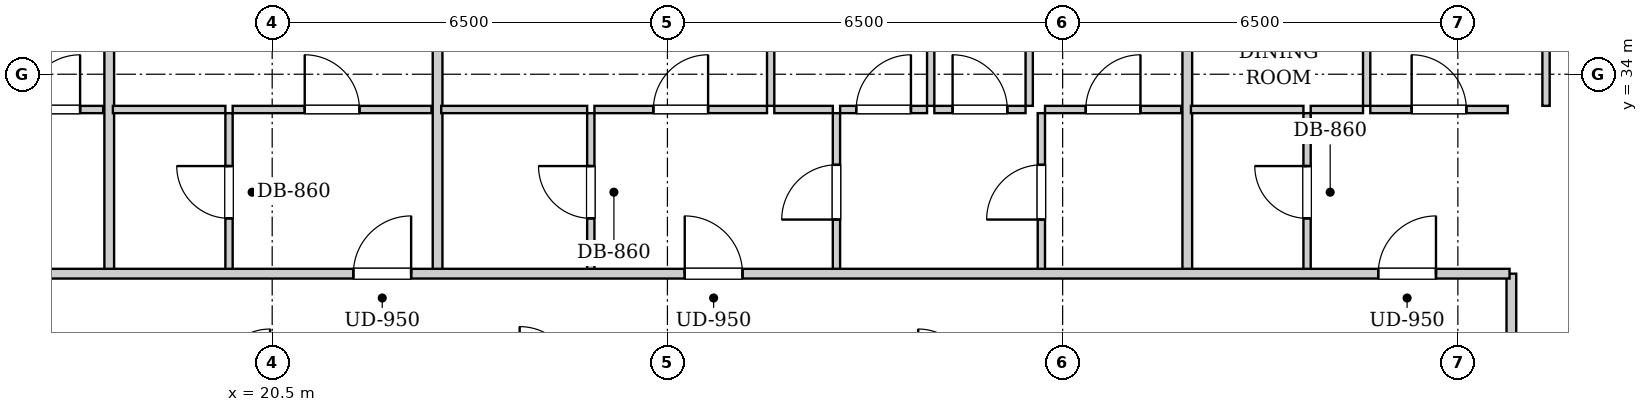
"""IFC4 building model, lengths in metres.
Left out: names, types, materials, properties, quantities, classifications, styles, units other than length and angle.
Written with IfcOpenShell. Run it as: python <this file> out.ifc"""

import sys

from ifc_helpers import new_model, si_unit, direction, frame, frame_2d, origin, place, context, subcontext, project, spatial, rectangle, extrude, element, fill, save


model = new_model("IFC4")
c1 = context("Model", 3, precision=1e-05, world=origin(), true_north=direction((0.0, 1.0)))
c2 = subcontext(c1, "Body", "Model", "MODEL_VIEW")
j1 = project(units=[si_unit("LENGTHUNIT", "METRE"), si_unit("PLANEANGLEUNIT", "RADIAN")], contexts=[c1])
p1 = place(None, origin())
s1 = spatial("IfcSite", under=j1, at=p1, CompositionType="ELEMENT")
p2 = place(p1, origin())
s2 = spatial("IfcBuilding", under=s1, at=p2, CompositionType="ELEMENT")
p3 = place(p2, frame((0.0, 0.0, 107.1)))
s3 = spatial("IfcBuildingStorey", under=s2, at=p3, CompositionType="ELEMENT", Elevation=107.1)
p4 = place(p3, frame((40.88, 28.98, 0.0), z_axis=(0.0, 0.0, 1.0), x_axis=(0.0, 1.0, 0.0)))
e1 = element("IfcWall", 1, at=p4, inside=s3, PredefinedType="PARTITIONING", context=c2, shape_type="SweptSolid", body=[
    extrude(rectangle(XDim=1.74, YDim=0.16, at=frame_2d((0.87, 0.0))), origin(), (0.0, 0.0, 1.0), 2.94),
])
p5 = place(p3, frame((16.062, 33.42, 0.0), z_axis=(0.0, 0.0, 1.0), x_axis=(1.0, 0.0, 0.0)))
e2 = element("IfcWall", 2, at=p5, inside=s3, PredefinedType="PARTITIONING", context=c2, shape_type="SweptSolid", body=[
    extrude(rectangle(XDim=1.658, YDim=0.12, at=frame_2d((0.829, 0.0))), origin(), (0.0, 0.0, 1.0), 2.94),
])
p6 = place(p5, frame((0.379, 0.0, 0.0)))
e3 = element("IfcOpeningElement", 3, at=p6, cuts=e2, PredefinedType="OPENING", context=c2, shape_type="SweptSolid", body=[
    extrude(rectangle(XDim=0.9, YDim=2.05, at=frame_2d((0.45, 1.025))), frame((0.0, 0.07, 0.0), z_axis=(0.0, -1.0, 0.0), x_axis=(1.0, 0.0, 0.0)), (0.0, 0.0, 1.0), 0.14),
])
p7 = place(p3, frame((17.82, 30.76, 0.0), z_axis=(0.0, 0.0, 1.0), x_axis=(0.0, 1.0, 0.0)))
e4 = element("IfcWall", 4, at=p7, inside=s3, PredefinedType="PARTITIONING", context=c2, shape_type="SweptSolid", body=[
    extrude(rectangle(XDim=12.26, YDim=0.16, at=frame_2d((6.13, 0.0))), origin(), (0.0, 0.0, 1.0), 2.313),
])
p8 = place(p3, frame((19.79, 30.76, 0.0), z_axis=(0.0, 0.0, 1.0), x_axis=(0.0, 1.0, 0.0)))
e5 = element("IfcWall", 5, at=p8, inside=s3, PredefinedType="PARTITIONING", context=c2, shape_type="SweptSolid", body=[
    extrude(rectangle(XDim=2.6, YDim=0.12, at=frame_2d((1.3, 0.0))), origin(), (0.0, 0.0, 1.0), 2.94),
])
p9 = place(p8, frame((0.87, 0.0, 0.0)))
e6 = element("IfcOpeningElement", 6, at=p9, cuts=e5, PredefinedType="OPENING", context=c2, shape_type="SweptSolid", body=[
    extrude(rectangle(XDim=0.86, YDim=2.05, at=frame_2d((0.43, 1.025))), frame((0.0, 0.07, 0.0), z_axis=(0.0, -1.0, 0.0), x_axis=(1.0, 0.0, 0.0)), (0.0, 0.0, 1.0), 0.14),
])
p10 = place(p3, frame((17.88, 33.42, 0.0), z_axis=(0.0, 0.0, 1.0), x_axis=(1.0, 0.0, 0.0)))
e7 = element("IfcWall", 7, at=p10, inside=s3, PredefinedType="PARTITIONING", context=c2, shape_type="SweptSolid", body=[
    extrude(rectangle(XDim=1.85, YDim=0.12, at=frame_2d((0.925, 0.0))), origin(), (0.0, 0.0, 1.0), 2.94),
])
p11 = place(p3, frame((19.85, 33.42, 0.0), z_axis=(0.0, 0.0, 1.0), x_axis=(1.0, 0.0, 0.0)))
e8 = element("IfcWall", 8, at=p11, inside=s3, PredefinedType="PARTITIONING", context=c2, shape_type="SweptSolid", body=[
    extrude(rectangle(XDim=3.27, YDim=0.12, at=frame_2d((1.635, 0.0))), origin(), (0.0, 0.0, 1.0), 2.94),
])
p12 = place(p11, frame((1.185, 0.0, 0.0)))
e9 = element("IfcOpeningElement", 9, at=p12, cuts=e8, PredefinedType="OPENING", context=c2, shape_type="SweptSolid", body=[
    extrude(rectangle(XDim=0.9, YDim=2.05, at=frame_2d((0.45, 1.025))), frame((0.0, 0.07, 0.0), z_axis=(0.0, -1.0, 0.0), x_axis=(1.0, 0.0, 0.0)), (0.0, 0.0, 1.0), 0.14),
])
p13 = place(p3, frame((23.22, 30.76, 0.0), z_axis=(0.0, 0.0, 1.0), x_axis=(0.0, 1.0, 0.0)))
e10 = element("IfcWall", 10, at=p13, inside=s3, PredefinedType="PARTITIONING", context=c2, shape_type="SweptSolid", body=[
    extrude(rectangle(XDim=12.26, YDim=0.16, at=frame_2d((6.13, 0.0))), origin(), (0.0, 0.0, 1.0), 2.94),
])
p14 = place(p3, frame((25.74, 30.76, 0.0), z_axis=(0.0, 0.0, 1.0), x_axis=(0.0, 1.0, 0.0)))
e11 = element("IfcWall", 11, at=p14, inside=s3, PredefinedType="PARTITIONING", context=c2, shape_type="SweptSolid", body=[
    extrude(rectangle(XDim=2.6, YDim=0.12, at=frame_2d((1.3, 0.0))), origin(), (0.0, 0.0, 1.0), 2.94),
])
p15 = place(p14, frame((0.87, 0.0, 0.0)))
e12 = element("IfcOpeningElement", 12, at=p15, cuts=e11, PredefinedType="OPENING", context=c2, shape_type="SweptSolid", body=[
    extrude(rectangle(XDim=0.86, YDim=2.05, at=frame_2d((0.43, 1.025))), frame((0.0, 0.07, 0.0), z_axis=(0.0, -1.0, 0.0), x_axis=(1.0, 0.0, 0.0)), (0.0, 0.0, 1.0), 0.14),
])
p16 = place(p3, frame((23.28, 33.42, 0.0), z_axis=(0.0, 0.0, 1.0), x_axis=(1.0, 0.0, 0.0)))
e13 = element("IfcWall", 13, at=p16, inside=s3, PredefinedType="PARTITIONING", context=c2, shape_type="SweptSolid", body=[
    extrude(rectangle(XDim=2.4, YDim=0.12, at=frame_2d((1.2, 0.0))), origin(), (0.0, 0.0, 1.0), 2.94),
])
p17 = place(p3, frame((29.78, 30.76, 0.0), z_axis=(0.0, 0.0, 1.0), x_axis=(0.0, 1.0, 0.0)))
e14 = element("IfcWall", 14, at=p17, inside=s3, PredefinedType="PARTITIONING", context=c2, shape_type="SweptSolid", body=[
    extrude(rectangle(XDim=2.6, YDim=0.12, at=frame_2d((1.3, 0.0))), origin(), (0.0, 0.0, 1.0), 2.94),
])
p18 = place(p17, frame((0.85, 0.0, 0.0)))
e15 = element("IfcOpeningElement", 15, at=p18, cuts=e14, PredefinedType="OPENING", context=c2, shape_type="SweptSolid", body=[
    extrude(rectangle(XDim=0.9, YDim=2.05, at=frame_2d((0.45, 1.025))), frame((0.0, 0.07, 0.0), z_axis=(0.0, -1.0, 0.0), x_axis=(1.0, 0.0, 0.0)), (0.0, 0.0, 1.0), 0.14),
])
p19 = place(p3, frame((25.8, 33.42, 0.0), z_axis=(0.0, 0.0, 1.0), x_axis=(1.0, 0.0, 0.0)))
e16 = element("IfcWall", 16, at=p19, inside=s3, PredefinedType="PARTITIONING", context=c2, shape_type="SweptSolid", body=[
    extrude(rectangle(XDim=2.838, YDim=0.12, at=frame_2d((1.419, 0.0))), origin(), (0.0, 0.0, 1.0), 2.94),
])
p20 = place(p19, frame((0.969, 0.0, 0.0)))
e17 = element("IfcOpeningElement", 17, at=p20, cuts=e16, PredefinedType="OPENING", context=c2, shape_type="SweptSolid", body=[
    extrude(rectangle(XDim=0.9, YDim=2.05, at=frame_2d((0.45, 1.025))), frame((0.0, 0.07, 0.0), z_axis=(0.0, -1.0, 0.0), x_axis=(1.0, 0.0, 0.0)), (0.0, 0.0, 1.0), 0.14),
])
p21 = place(p3, frame((28.758, 33.42, 0.0), z_axis=(0.0, 0.0, 1.0), x_axis=(1.0, 0.0, 0.0)))
e18 = element("IfcWall", 18, at=p21, inside=s3, PredefinedType="PARTITIONING", context=c2, shape_type="SweptSolid", body=[
    extrude(rectangle(XDim=0.962, YDim=0.12, at=frame_2d((0.481, 0.0))), origin(), (0.0, 0.0, 1.0), 2.94),
])
p22 = place(p3, frame((33.15, 30.76, 0.0), z_axis=(0.0, 0.0, 1.0), x_axis=(0.0, 1.0, 0.0)))
e19 = element("IfcWall", 19, at=p22, inside=s3, PredefinedType="PARTITIONING", context=c2, shape_type="SweptSolid", body=[
    extrude(rectangle(XDim=2.6, YDim=0.12, at=frame_2d((1.3, 0.0))), origin(), (0.0, 0.0, 1.0), 2.313),
])
p23 = place(p22, frame((0.85, 0.0, 0.0)))
e20 = element("IfcOpeningElement", 20, at=p23, cuts=e19, PredefinedType="OPENING", context=c2, shape_type="SweptSolid", body=[
    extrude(rectangle(XDim=0.9, YDim=2.05, at=frame_2d((0.45, 1.025))), frame((0.0, 0.07, 0.0), z_axis=(0.0, -1.0, 0.0), x_axis=(1.0, 0.0, 0.0)), (0.0, 0.0, 1.0), 0.14),
])
p24 = place(p3, frame((29.84, 33.42, 0.0), z_axis=(0.0, 0.0, 1.0), x_axis=(1.0, 0.0, 0.0)))
e21 = element("IfcWall", 21, at=p24, inside=s3, PredefinedType="PARTITIONING", context=c2, shape_type="SweptSolid", body=[
    extrude(rectangle(XDim=1.43, YDim=0.12, at=frame_2d((0.715, 0.0))), origin(), (0.0, 0.0, 1.0), 2.94),
])
p25 = place(p24, frame((0.265, 0.0, 0.0)))
e22 = element("IfcOpeningElement", 22, at=p25, cuts=e21, PredefinedType="OPENING", context=c2, shape_type="SweptSolid", body=[
    extrude(rectangle(XDim=0.9, YDim=2.05, at=frame_2d((0.45, 1.025))), frame((0.0, 0.07, 0.0), z_axis=(0.0, -1.0, 0.0), x_axis=(1.0, 0.0, 0.0)), (0.0, 0.0, 1.0), 0.14),
])
p26 = place(p3, frame((31.39, 33.42, 0.0), z_axis=(0.0, 0.0, 1.0), x_axis=(1.0, 0.0, 0.0)))
e23 = element("IfcWall", 23, at=p26, inside=s3, PredefinedType="PARTITIONING", context=c2, shape_type="SweptSolid", body=[
    extrude(rectangle(XDim=1.5, YDim=0.12, at=frame_2d((0.75, 0.0))), origin(), (0.0, 0.0, 1.0), 2.94),
])
p27 = place(p26, frame((0.3, 0.0, 0.0)))
e24 = element("IfcOpeningElement", 24, at=p27, cuts=e23, PredefinedType="OPENING", context=c2, shape_type="SweptSolid", body=[
    extrude(rectangle(XDim=0.9, YDim=2.05, at=frame_2d((0.45, 1.025))), frame((0.0, 0.07, 0.0), z_axis=(0.0, -1.0, 0.0), x_axis=(1.0, 0.0, 0.0)), (0.0, 0.0, 1.0), 0.14),
])
p28 = place(p3, frame((33.21, 33.42, 0.0), z_axis=(0.0, 0.0, 1.0), x_axis=(1.0, 0.0, 0.0)))
e25 = element("IfcWall", 25, at=p28, inside=s3, PredefinedType="PARTITIONING", context=c2, shape_type="SweptSolid", body=[
    extrude(rectangle(XDim=2.24, YDim=0.12, at=frame_2d((1.12, 0.0))), origin(), (0.0, 0.0, 1.0), 2.94),
])
p29 = place(p28, frame((0.67, 0.0, 0.0)))
e26 = element("IfcOpeningElement", 26, at=p29, cuts=e25, PredefinedType="OPENING", context=c2, shape_type="SweptSolid", body=[
    extrude(rectangle(XDim=0.9, YDim=2.05, at=frame_2d((0.45, 1.025))), frame((0.0, 0.07, 0.0), z_axis=(0.0, -1.0, 0.0), x_axis=(1.0, 0.0, 0.0)), (0.0, 0.0, 1.0), 0.14),
])
p30 = place(p3, frame((28.698, 33.48, 0.0), z_axis=(0.0, 0.0, 1.0), x_axis=(0.0, 1.0, 0.0)))
e27 = element("IfcWall", 27, at=p30, inside=s3, PredefinedType="PARTITIONING", context=c2, shape_type="SweptSolid", body=[
    extrude(rectangle(XDim=9.54, YDim=0.12, at=frame_2d((4.77, 0.0))), origin(), (0.0, 0.0, 1.0), 2.94),
])
p31 = place(p30, frame((4.305, 0.0, 0.0)))
e28 = element("IfcOpeningElement", 28, at=p31, cuts=e27, PredefinedType="OPENING", context=c2, shape_type="SweptSolid", body=[
    extrude(rectangle(XDim=0.9, YDim=2.05, at=frame_2d((0.45, 1.025))), frame((0.0, 0.07, 0.0), z_axis=(0.0, -1.0, 0.0), x_axis=(1.0, 0.0, 0.0)), (0.0, 0.0, 1.0), 0.14),
])
p32 = place(p3, frame((31.33, 33.48, 0.0), z_axis=(0.0, 0.0, 1.0), x_axis=(0.0, 1.0, 0.0)))
e29 = element("IfcWall", 29, at=p32, inside=s3, PredefinedType="PARTITIONING", context=c2, shape_type="SweptSolid", body=[
    extrude(rectangle(XDim=9.54, YDim=0.12, at=frame_2d((4.77, 0.0))), origin(), (0.0, 0.0, 1.0), 2.94),
])
p33 = place(p32, frame((4.305, 0.0, 0.0)))
e30 = element("IfcOpeningElement", 30, at=p33, cuts=e29, PredefinedType="OPENING", context=c2, shape_type="SweptSolid", body=[
    extrude(rectangle(XDim=0.9, YDim=2.05, at=frame_2d((0.45, 1.025))), frame((0.0, 0.07, 0.0), z_axis=(0.0, -1.0, 0.0), x_axis=(1.0, 0.0, 0.0)), (0.0, 0.0, 1.0), 0.14),
])
p34 = place(p3, frame((32.95, 33.48, 0.0), z_axis=(0.0, 0.0, 1.0), x_axis=(0.0, 1.0, 0.0)))
e31 = element("IfcWall", 31, at=p34, inside=s3, PredefinedType="PARTITIONING", context=c2, shape_type="SweptSolid", body=[
    extrude(rectangle(XDim=7.39, YDim=0.12, at=frame_2d((3.695, 0.0))), origin(), (0.0, 0.0, 1.0), 2.94),
])
p35 = place(p34, frame((3.245, 0.0, 0.0)))
e32 = element("IfcOpeningElement", 32, at=p35, cuts=e31, PredefinedType="OPENING", context=c2, shape_type="SweptSolid", body=[
    extrude(rectangle(XDim=0.9, YDim=2.05, at=frame_2d((0.45, 1.025))), frame((0.0, 0.07, 0.0), z_axis=(0.0, -1.0, 0.0), x_axis=(1.0, 0.0, 0.0)), (0.0, 0.0, 1.0), 0.14),
])
p36 = place(p3, frame((35.55, 30.76, 0.0), z_axis=(0.0, 0.0, 1.0), x_axis=(0.0, 1.0, 0.0)))
e33 = element("IfcWall", 33, at=p36, inside=s3, PredefinedType="PARTITIONING", context=c2, shape_type="SweptSolid", body=[
    extrude(rectangle(XDim=10.28, YDim=0.16, at=frame_2d((5.14, 0.0))), origin(), (0.0, 0.0, 1.0), 2.94),
])
p37 = place(p3, frame((37.52, 30.76, 0.0), z_axis=(0.0, 0.0, 1.0), x_axis=(0.0, 1.0, 0.0)))
e34 = element("IfcWall", 34, at=p37, inside=s3, PredefinedType="PARTITIONING", context=c2, shape_type="SweptSolid", body=[
    extrude(rectangle(XDim=2.6, YDim=0.12, at=frame_2d((1.3, 0.0))), origin(), (0.0, 0.0, 1.0), 2.94),
])
p38 = place(p37, frame((0.87, 0.0, 0.0)))
e35 = element("IfcOpeningElement", 35, at=p38, cuts=e34, PredefinedType="OPENING", context=c2, shape_type="SweptSolid", body=[
    extrude(rectangle(XDim=0.86, YDim=2.05, at=frame_2d((0.43, 1.025))), frame((0.0, 0.07, 0.0), z_axis=(0.0, -1.0, 0.0), x_axis=(1.0, 0.0, 0.0)), (0.0, 0.0, 1.0), 0.14),
])
p39 = place(p3, frame((35.61, 33.42, 0.0), z_axis=(0.0, 0.0, 1.0), x_axis=(1.0, 0.0, 0.0)))
e36 = element("IfcWall", 36, at=p39, inside=s3, PredefinedType="PARTITIONING", context=c2, shape_type="SweptSolid", body=[
    extrude(rectangle(XDim=1.85, YDim=0.12, at=frame_2d((0.925, 0.0))), origin(), (0.0, 0.0, 1.0), 2.94),
])
p40 = place(p3, frame((37.58, 33.42, 0.0), z_axis=(0.0, 0.0, 1.0), x_axis=(1.0, 0.0, 0.0)))
e37 = element("IfcWall", 37, at=p40, inside=s3, PredefinedType="PARTITIONING", context=c2, shape_type="SweptSolid", body=[
    extrude(rectangle(XDim=0.86, YDim=0.12, at=frame_2d((0.43, 0.0))), origin(), (0.0, 0.0, 1.0), 2.94),
])
p41 = place(p3, frame((38.56, 33.42, 0.0), z_axis=(0.0, 0.0, 1.0), x_axis=(1.0, 0.0, 0.0)))
e38 = element("IfcWall", 38, at=p41, inside=s3, PredefinedType="PARTITIONING", context=c2, shape_type="SweptSolid", body=[
    extrude(rectangle(XDim=2.26, YDim=0.12, at=frame_2d((1.13, 0.0))), origin(), (0.0, 0.0, 1.0), 2.94),
])
p42 = place(p41, frame((0.68, 0.0, 0.0)))
e39 = element("IfcOpeningElement", 39, at=p42, cuts=e38, PredefinedType="OPENING", context=c2, shape_type="SweptSolid", body=[
    extrude(rectangle(XDim=0.9, YDim=2.05, at=frame_2d((0.45, 1.025))), frame((0.0, 0.07, 0.0), z_axis=(0.0, -1.0, 0.0), x_axis=(1.0, 0.0, 0.0)), (0.0, 0.0, 1.0), 0.14),
])
p43 = place(p3, frame((38.5, 33.48, 0.0), z_axis=(0.0, 0.0, 1.0), x_axis=(0.0, 1.0, 0.0)))
e40 = element("IfcWall", 40, at=p43, inside=s3, PredefinedType="PARTITIONING", context=c2, shape_type="SweptSolid", body=[
    extrude(rectangle(XDim=7.39, YDim=0.12, at=frame_2d((3.695, 0.0))), origin(), (0.0, 0.0, 1.0), 2.94),
])
p44 = place(p43, frame((3.245, 0.0, 0.0)))
e41 = element("IfcOpeningElement", 41, at=p44, cuts=e40, PredefinedType="OPENING", context=c2, shape_type="SweptSolid", body=[
    extrude(rectangle(XDim=0.9, YDim=2.05, at=frame_2d((0.45, 1.025))), frame((0.0, 0.07, 0.0), z_axis=(0.0, -1.0, 0.0), x_axis=(1.0, 0.0, 0.0)), (0.0, 0.0, 1.0), 0.14),
])
p45 = place(p3, frame((41.45, 33.48, 0.0), z_axis=(0.0, 0.0, 1.0), x_axis=(0.0, 1.0, 0.0)))
e42 = element("IfcWall", 42, at=p45, inside=s3, PredefinedType="PARTITIONING", context=c2, shape_type="SweptSolid", body=[
    extrude(rectangle(XDim=7.39, YDim=0.12, at=frame_2d((3.695, 0.0))), origin(), (0.0, 0.0, 1.0), 2.94),
])
p46 = place(p45, frame((3.2, 0.0, 0.0)))
e43 = element("IfcOpeningElement", 43, at=p46, cuts=e42, PredefinedType="OPENING", context=c2, shape_type="SweptSolid", body=[
    extrude(rectangle(XDim=0.9, YDim=2.05, at=frame_2d((0.45, 1.025))), frame((0.0, 0.07, 0.0), z_axis=(0.0, -1.0, 0.0), x_axis=(1.0, 0.0, 0.0)), (0.0, 0.0, 1.0), 0.14),
])
p47 = place(p3, frame((10.05, 30.72, 0.0), z_axis=(0.0, 0.0, 1.0), x_axis=(1.0, 0.0, 0.0)))
e44 = element("IfcWall", 44, at=p47, inside=s3, PredefinedType="PARTITIONING", context=c2, shape_type="SweptSolid", body=[
    extrude(rectangle(XDim=30.8, YDim=0.16, at=frame_2d((15.4, 0.0))), origin(), (0.0, 0.0, 1.0), 2.94),
])
p48 = place(p47, frame((3.692, 0.0, 0.0)))
e45 = element("IfcOpeningElement", 45, at=p48, cuts=e44, PredefinedType="OPENING", context=c2, shape_type="SweptSolid", body=[
    extrude(rectangle(XDim=0.95, YDim=2.1, at=frame_2d((0.475, 1.05))), frame((0.0, 0.09, 0.0), z_axis=(0.0, -1.0, 0.0), x_axis=(1.0, 0.0, 0.0)), (0.0, 0.0, 1.0), 0.18),
])
p49 = place(p47, frame((11.785, 0.0, 0.0)))
e46 = element("IfcOpeningElement", 46, at=p49, cuts=e44, PredefinedType="OPENING", context=c2, shape_type="SweptSolid", body=[
    extrude(rectangle(XDim=0.95, YDim=2.1, at=frame_2d((0.475, 1.05))), frame((0.0, 0.09, 0.0), z_axis=(0.0, -1.0, 0.0), x_axis=(1.0, 0.0, 0.0)), (0.0, 0.0, 1.0), 0.18),
])
p50 = place(p47, frame((17.235, 0.0, 0.0)))
e47 = element("IfcOpeningElement", 47, at=p50, cuts=e44, PredefinedType="OPENING", context=c2, shape_type="SweptSolid", body=[
    extrude(rectangle(XDim=0.95, YDim=2.1, at=frame_2d((0.475, 1.05))), frame((0.0, 0.09, 0.0), z_axis=(0.0, -1.0, 0.0), x_axis=(1.0, 0.0, 0.0)), (0.0, 0.0, 1.0), 0.18),
])
p51 = place(p47, frame((28.64, 0.0, 0.0)))
e48 = element("IfcOpeningElement", 48, at=p51, cuts=e44, PredefinedType="OPENING", context=c2, shape_type="SweptSolid", body=[
    extrude(rectangle(XDim=0.95, YDim=2.1, at=frame_2d((0.475, 1.05))), frame((0.0, 0.09, 0.0), z_axis=(0.0, -1.0, 0.0), x_axis=(1.0, 0.0, 0.0)), (0.0, 0.0, 1.0), 0.18),
])
p52 = place(p6, origin())
e49 = element("IfcDoor", 49, at=p52, inside=s3, OperationType="SINGLE_SWING_RIGHT", PredefinedType="DOOR", context=c2, shape_type="SweptSolid", body=[
    extrude(rectangle(XDim=0.9, YDim=2.05, at=frame_2d((0.45, 1.025))), frame((0.0, 0.025, 0.0), z_axis=(0.0, -1.0, 0.0), x_axis=(1.0, 0.0, 0.0)), (0.0, 0.0, 1.0), 0.05),
])
fill(e3, e49)
p53 = place(p9, origin())
e50 = element("IfcDoor", 50, at=p53, inside=s3, OperationType="SINGLE_SWING_RIGHT", PredefinedType="DOOR", context=c2, shape_type="SweptSolid", body=[
    extrude(rectangle(XDim=0.86, YDim=2.05, at=frame_2d((0.43, 1.025))), frame((0.0, 0.025, 0.0), z_axis=(0.0, -1.0, 0.0), x_axis=(1.0, 0.0, 0.0)), (0.0, 0.0, 1.0), 0.05),
])
fill(e6, e50)
p54 = place(p12, origin())
e51 = element("IfcDoor", 51, at=p54, inside=s3, OperationType="SINGLE_SWING_LEFT", PredefinedType="DOOR", context=c2, shape_type="SweptSolid", body=[
    extrude(rectangle(XDim=0.9, YDim=2.05, at=frame_2d((0.45, 1.025))), frame((0.0, 0.025, 0.0), z_axis=(0.0, -1.0, 0.0), x_axis=(1.0, 0.0, 0.0)), (0.0, 0.0, 1.0), 0.05),
])
fill(e9, e51)
p55 = place(p15, origin())
e52 = element("IfcDoor", 52, at=p55, inside=s3, OperationType="SINGLE_SWING_RIGHT", PredefinedType="DOOR", context=c2, shape_type="SweptSolid", body=[
    extrude(rectangle(XDim=0.86, YDim=2.05, at=frame_2d((0.43, 1.025))), frame((0.0, 0.025, 0.0), z_axis=(0.0, -1.0, 0.0), x_axis=(1.0, 0.0, 0.0)), (0.0, 0.0, 1.0), 0.05),
])
fill(e12, e52)
p56 = place(p18, origin())
e53 = element("IfcDoor", 53, at=p56, inside=s3, OperationType="SINGLE_SWING_LEFT", PredefinedType="DOOR", context=c2, shape_type="SweptSolid", body=[
    extrude(rectangle(XDim=0.9, YDim=2.05, at=frame_2d((0.45, 1.025))), frame((0.0, 0.025, 0.0), z_axis=(0.0, -1.0, 0.0), x_axis=(1.0, 0.0, 0.0)), (0.0, 0.0, 1.0), 0.05),
])
fill(e15, e53)
p57 = place(p20, origin())
e54 = element("IfcDoor", 54, at=p57, inside=s3, OperationType="SINGLE_SWING_RIGHT", PredefinedType="DOOR", context=c2, shape_type="SweptSolid", body=[
    extrude(rectangle(XDim=0.9, YDim=2.05, at=frame_2d((0.45, 1.025))), frame((0.0, 0.025, 0.0), z_axis=(0.0, -1.0, 0.0), x_axis=(1.0, 0.0, 0.0)), (0.0, 0.0, 1.0), 0.05),
])
fill(e17, e54)
p58 = place(p23, origin())
e55 = element("IfcDoor", 55, at=p58, inside=s3, OperationType="SINGLE_SWING_LEFT", PredefinedType="DOOR", context=c2, shape_type="SweptSolid", body=[
    extrude(rectangle(XDim=0.9, YDim=2.05, at=frame_2d((0.45, 1.025))), frame((0.0, 0.025, 0.0), z_axis=(0.0, -1.0, 0.0), x_axis=(1.0, 0.0, 0.0)), (0.0, 0.0, 1.0), 0.05),
])
fill(e20, e55)
p59 = place(p25, origin())
e56 = element("IfcDoor", 56, at=p59, inside=s3, OperationType="SINGLE_SWING_RIGHT", PredefinedType="DOOR", context=c2, shape_type="SweptSolid", body=[
    extrude(rectangle(XDim=0.9, YDim=2.05, at=frame_2d((0.45, 1.025))), frame((0.0, 0.025, 0.0), z_axis=(0.0, -1.0, 0.0), x_axis=(1.0, 0.0, 0.0)), (0.0, 0.0, 1.0), 0.05),
])
fill(e22, e56)
p60 = place(p27, origin())
e57 = element("IfcDoor", 57, at=p60, inside=s3, OperationType="SINGLE_SWING_LEFT", PredefinedType="DOOR", context=c2, shape_type="SweptSolid", body=[
    extrude(rectangle(XDim=0.9, YDim=2.05, at=frame_2d((0.45, 1.025))), frame((0.0, 0.025, 0.0), z_axis=(0.0, -1.0, 0.0), x_axis=(1.0, 0.0, 0.0)), (0.0, 0.0, 1.0), 0.05),
])
fill(e24, e57)
p61 = place(p29, origin())
e58 = element("IfcDoor", 58, at=p61, inside=s3, OperationType="SINGLE_SWING_RIGHT", PredefinedType="DOOR", context=c2, shape_type="SweptSolid", body=[
    extrude(rectangle(XDim=0.9, YDim=2.05, at=frame_2d((0.45, 1.025))), frame((0.0, 0.025, 0.0), z_axis=(0.0, -1.0, 0.0), x_axis=(1.0, 0.0, 0.0)), (0.0, 0.0, 1.0), 0.05),
])
fill(e26, e58)
p62 = place(p38, origin())
e59 = element("IfcDoor", 59, at=p62, inside=s3, OperationType="SINGLE_SWING_RIGHT", PredefinedType="DOOR", context=c2, shape_type="SweptSolid", body=[
    extrude(rectangle(XDim=0.86, YDim=2.05, at=frame_2d((0.43, 1.025))), frame((0.0, 0.025, 0.0), z_axis=(0.0, -1.0, 0.0), x_axis=(1.0, 0.0, 0.0)), (0.0, 0.0, 1.0), 0.05),
])
fill(e35, e59)
p63 = place(p42, origin())
e60 = element("IfcDoor", 60, at=p63, inside=s3, OperationType="SINGLE_SWING_LEFT", PredefinedType="DOOR", context=c2, shape_type="SweptSolid", body=[
    extrude(rectangle(XDim=0.9, YDim=2.05, at=frame_2d((0.45, 1.025))), frame((0.0, 0.025, 0.0), z_axis=(0.0, -1.0, 0.0), x_axis=(1.0, 0.0, 0.0)), (0.0, 0.0, 1.0), 0.05),
])
fill(e39, e60)
p64 = place(p49, origin())
e61 = element("IfcDoor", 61, at=p64, inside=s3, OperationType="SINGLE_SWING_RIGHT", PredefinedType="DOOR", context=c2, shape_type="SweptSolid", body=[
    extrude(rectangle(XDim=0.95, YDim=2.1, at=frame_2d((0.475, 1.05))), frame((0.0, 0.025, 0.0), z_axis=(0.0, -1.0, 0.0), x_axis=(1.0, 0.0, 0.0)), (0.0, 0.0, 1.0), 0.05),
])
fill(e46, e61)
p65 = place(p50, origin())
e62 = element("IfcDoor", 62, at=p65, inside=s3, OperationType="SINGLE_SWING_LEFT", PredefinedType="DOOR", context=c2, shape_type="SweptSolid", body=[
    extrude(rectangle(XDim=0.95, YDim=2.1, at=frame_2d((0.475, 1.05))), frame((0.0, 0.025, 0.0), z_axis=(0.0, -1.0, 0.0), x_axis=(1.0, 0.0, 0.0)), (0.0, 0.0, 1.0), 0.05),
])
fill(e47, e62)
p66 = place(p51, origin())
e63 = element("IfcDoor", 63, at=p66, inside=s3, OperationType="SINGLE_SWING_RIGHT", PredefinedType="DOOR", context=c2, shape_type="SweptSolid", body=[
    extrude(rectangle(XDim=0.95, YDim=2.1, at=frame_2d((0.475, 1.05))), frame((0.0, 0.025, 0.0), z_axis=(0.0, -1.0, 0.0), x_axis=(1.0, 0.0, 0.0)), (0.0, 0.0, 1.0), 0.05),
])
fill(e48, e63)
save(model, sys.argv[1])
